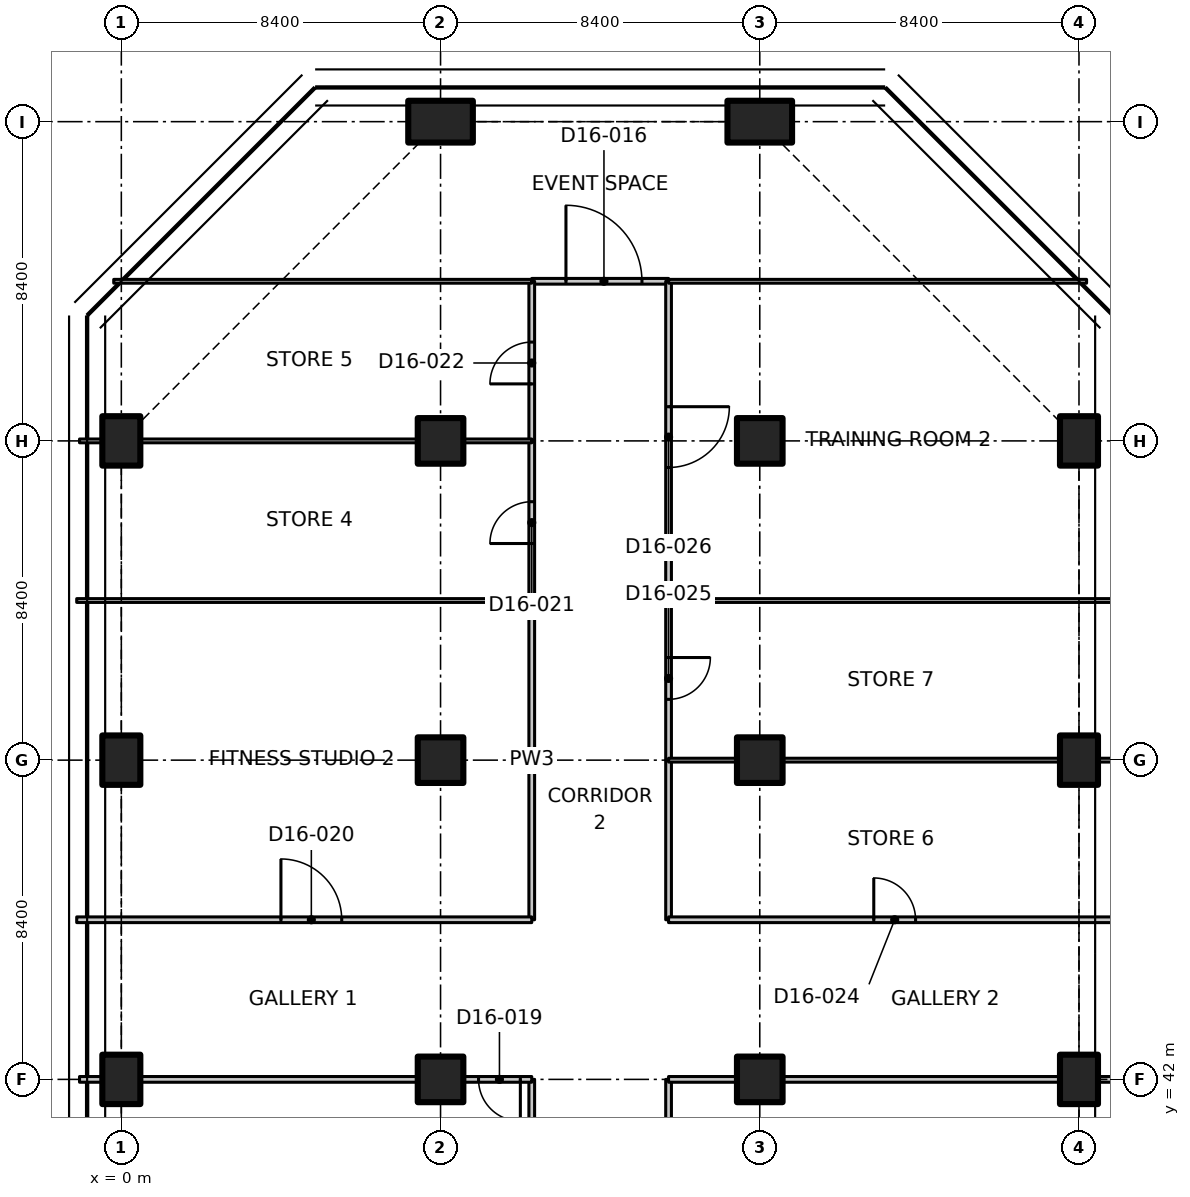
"""IFC4 building model, lengths in metres.
Left out: names, types, materials, properties, quantities, classifications, styles, units other than length and angle.
Written with IfcOpenShell. Run it as: python <this file> out.ifc"""

import sys

from ifc_helpers import new_model, si_unit, direction, frame, frame_2d, origin, origin_2d, place, context, subcontext, project, spatial, polyline, rectangle, outline, extrude, element, fill, save


model = new_model("IFC4")
c1 = context("Model", 3, precision=1e-05, world=origin(), true_north=direction((0.0, 1.0)))
c2 = subcontext(c1, "Body", "Model", "MODEL_VIEW")
j1 = project(units=[si_unit("LENGTHUNIT", "METRE"), si_unit("PLANEANGLEUNIT", "RADIAN")], contexts=[c1])
p1 = place(None, origin())
s1 = spatial("IfcSite", under=j1, at=p1, CompositionType="ELEMENT")
p2 = place(p1, origin())
s2 = spatial("IfcBuilding", under=s1, at=p2, CompositionType="ELEMENT")
p3 = place(p2, frame((0.0, 0.0, 124.1)))
s3 = spatial("IfcBuildingStorey", under=s2, at=p3, CompositionType="ELEMENT", Elevation=124.1)
for number, where, z_axis, x_axis in (
    (1, (0.0, 42.0, 0.0), (0.0, 0.0, 1.0), (1.0, 0.0, 0.0)),
    (2, (0.0, 50.4, 0.0), (0.0, 0.0, 1.0), (1.0, 0.0, 0.0)),
    (3, (0.0, 58.8, 0.0), (0.0, 0.0, 1.0), (1.0, 0.0, 0.0)),
):
    element("IfcColumn", number, at=place(p3, frame(where, z_axis=z_axis, x_axis=x_axis)), inside=s3, PredefinedType="COLUMN", context=c2, shape_type="SweptSolid", body=[
        extrude(rectangle(XDim=1.0, YDim=1.3, at=origin_2d()), origin(), (0.0, 0.0, 1.0), 3.35),
    ])
for number, where, z_axis, x_axis in (
    (4, (8.4, 42.0, 0.0), (0.0, 0.0, 1.0), (1.0, 0.0, 0.0)),
    (5, (8.4, 50.4, 0.0), (0.0, 0.0, 1.0), (1.0, 0.0, 0.0)),
    (6, (8.4, 58.8, 0.0), (0.0, 0.0, 1.0), (1.0, 0.0, 0.0)),
):
    element("IfcColumn", number, at=place(p3, frame(where, z_axis=z_axis, x_axis=x_axis)), inside=s3, PredefinedType="COLUMN", context=c2, shape_type="SweptSolid", body=[
        extrude(rectangle(XDim=1.2, YDim=1.2, at=origin_2d()), origin(), (0.0, 0.0, 1.0), 3.35),
    ])
p4 = place(p3, frame((8.4, 67.2, 0.0), z_axis=(0.0, 0.0, 1.0), x_axis=(0.0, 1.0, 0.0)))
e7 = element("IfcColumn", 7, at=p4, inside=s3, PredefinedType="COLUMN", context=c2, shape_type="SweptSolid", body=[
    extrude(rectangle(XDim=1.1, YDim=1.7, at=origin_2d()), origin(), (0.0, 0.0, 1.0), 3.35),
])
for number, where, z_axis, x_axis in (
    (8, (16.8, 42.0, 0.0), (0.0, 0.0, 1.0), (1.0, 0.0, 0.0)),
    (9, (16.8, 50.4, 0.0), (0.0, 0.0, 1.0), (1.0, 0.0, 0.0)),
    (10, (16.8, 58.8, 0.0), (0.0, 0.0, 1.0), (1.0, 0.0, 0.0)),
):
    element("IfcColumn", number, at=place(p3, frame(where, z_axis=z_axis, x_axis=x_axis)), inside=s3, PredefinedType="COLUMN", context=c2, shape_type="SweptSolid", body=[
        extrude(rectangle(XDim=1.2, YDim=1.2, at=origin_2d()), origin(), (0.0, 0.0, 1.0), 3.35),
    ])
p5 = place(p3, frame((16.8, 67.2, 0.0), z_axis=(0.0, 0.0, 1.0), x_axis=(0.0, 1.0, 0.0)))
e11 = element("IfcColumn", 11, at=p5, inside=s3, PredefinedType="COLUMN", context=c2, shape_type="SweptSolid", body=[
    extrude(rectangle(XDim=1.1, YDim=1.7, at=origin_2d()), origin(), (0.0, 0.0, 1.0), 3.35),
])
for number, where, z_axis, x_axis in (
    (12, (25.2, 42.0, 0.0), (0.0, 0.0, 1.0), (1.0, 0.0, 0.0)),
    (13, (25.2, 50.4, 0.0), (0.0, 0.0, 1.0), (1.0, 0.0, 0.0)),
    (14, (25.2, 58.8, 0.0), (0.0, 0.0, 1.0), (1.0, 0.0, 0.0)),
):
    element("IfcColumn", number, at=place(p3, frame(where, z_axis=z_axis, x_axis=x_axis)), inside=s3, PredefinedType="COLUMN", context=c2, shape_type="SweptSolid", body=[
        extrude(rectangle(XDim=1.0, YDim=1.3, at=origin_2d()), origin(), (0.0, 0.0, 1.0), 3.35),
    ])
p6 = place(p3, frame((10.8, 63.0, 0.0), z_axis=(0.0, 0.0, 1.0), x_axis=(1.0, 0.0, 0.0)))
e15 = element("IfcWall", 15, at=p6, inside=s3, PredefinedType="PARTITIONING", context=c2, shape_type="SweptSolid", body=[
    extrude(rectangle(XDim=3.6, YDim=0.15, at=frame_2d((1.8, 0.0))), origin(), (0.0, 0.0, 1.0), 3.33),
])
p7 = place(p6, frame((0.9, 0.0, 0.0)))
e16 = element("IfcOpeningElement", 16, at=p7, cuts=e15, PredefinedType="OPENING", context=c2, shape_type="SweptSolid", body=[
    extrude(rectangle(XDim=2.0, YDim=2.4, at=frame_2d((1.0, 1.2))), frame((0.0, 0.085, 0.0), z_axis=(0.0, -1.0, 0.0), x_axis=(1.0, 0.0, 0.0)), (0.0, 0.0, 1.0), 0.17),
])
p8 = place(p3, frame((10.8, 37.8, 0.0), z_axis=(0.0, 0.0, 1.0), x_axis=(0.0, 1.0, 0.0)))
e17 = element("IfcWall", 17, at=p8, inside=s3, PredefinedType="PARTITIONING", context=c2, shape_type="SweptSolid", body=[
    extrude(rectangle(XDim=4.2, YDim=0.15, at=frame_2d((2.1, 0.0))), origin(), (0.0, 0.0, 1.0), 3.33),
])
p9 = place(p3, frame((10.8, 46.2, 0.0), z_axis=(0.0, 0.0, 1.0), x_axis=(0.0, 1.0, 0.0)))
e18 = element("IfcWall", 18, at=p9, inside=s3, PredefinedType="PARTITIONING", context=c2, shape_type="SweptSolid", body=[
    extrude(rectangle(XDim=8.4, YDim=0.15, at=frame_2d((4.2, 0.0))), origin(), (0.0, 0.0, 1.0), 3.33),
])
p10 = place(p3, frame((10.8, 54.6, 0.0), z_axis=(0.0, 0.0, 1.0), x_axis=(0.0, 1.0, 0.0)))
e19 = element("IfcWall", 19, at=p10, inside=s3, PredefinedType="PARTITIONING", context=c2, shape_type="SweptSolid", body=[
    extrude(rectangle(XDim=4.2, YDim=0.15, at=frame_2d((2.1, 0.0))), origin(), (0.0, 0.0, 1.0), 3.33),
])
p11 = place(p10, frame((1.5, 0.0, 0.0)))
e20 = element("IfcOpeningElement", 20, at=p11, cuts=e19, PredefinedType="OPENING", context=c2, shape_type="SweptSolid", body=[
    extrude(rectangle(XDim=1.1, YDim=2.1, at=frame_2d((0.55, 1.05))), frame((0.0, 0.085, 0.0), z_axis=(0.0, -1.0, 0.0), x_axis=(1.0, 0.0, 0.0)), (0.0, 0.0, 1.0), 0.17),
])
p12 = place(p3, frame((10.8, 58.8, 0.0), z_axis=(0.0, 0.0, 1.0), x_axis=(0.0, 1.0, 0.0)))
e21 = element("IfcWall", 21, at=p12, inside=s3, PredefinedType="PARTITIONING", context=c2, shape_type="SweptSolid", body=[
    extrude(rectangle(XDim=4.2, YDim=0.15, at=frame_2d((2.1, 0.0))), origin(), (0.0, 0.0, 1.0), 3.33),
])
p13 = place(p12, frame((1.5, 0.0, 0.0)))
e22 = element("IfcOpeningElement", 22, at=p13, cuts=e21, PredefinedType="OPENING", context=c2, shape_type="SweptSolid", body=[
    extrude(rectangle(XDim=1.1, YDim=2.1, at=frame_2d((0.55, 1.05))), frame((0.0, 0.085, 0.0), z_axis=(0.0, -1.0, 0.0), x_axis=(1.0, 0.0, 0.0)), (0.0, 0.0, 1.0), 0.17),
])
p14 = place(p3, frame((14.4, 42.0, 0.0), z_axis=(0.0, 0.0, 1.0), x_axis=(0.0, -1.0, 0.0)))
e23 = element("IfcWall", 23, at=p14, inside=s3, PredefinedType="PARTITIONING", context=c2, shape_type="SweptSolid", body=[
    extrude(rectangle(XDim=8.4, YDim=0.15, at=frame_2d((4.2, 0.0))), origin(), (0.0, 0.0, 1.0), 3.33),
])
p15 = place(p3, frame((14.4, 50.4, 0.0), z_axis=(0.0, 0.0, 1.0), x_axis=(0.0, -1.0, 0.0)))
e24 = element("IfcWall", 24, at=p15, inside=s3, PredefinedType="PARTITIONING", context=c2, shape_type="SweptSolid", body=[
    extrude(rectangle(XDim=4.2, YDim=0.15, at=frame_2d((2.1, 0.0))), origin(), (0.0, 0.0, 1.0), 3.33),
])
p16 = place(p3, frame((14.4, 54.6, 0.0), z_axis=(0.0, 0.0, 1.0), x_axis=(0.0, -1.0, 0.0)))
e25 = element("IfcWall", 25, at=p16, inside=s3, PredefinedType="PARTITIONING", context=c2, shape_type="SweptSolid", body=[
    extrude(rectangle(XDim=4.2, YDim=0.15, at=frame_2d((2.1, 0.0))), origin(), (0.0, 0.0, 1.0), 3.33),
])
p17 = place(p16, frame((1.5, 0.0, 0.0)))
e26 = element("IfcOpeningElement", 26, at=p17, cuts=e25, PredefinedType="OPENING", context=c2, shape_type="SweptSolid", body=[
    extrude(rectangle(XDim=1.1, YDim=2.1, at=frame_2d((0.55, 1.05))), frame((0.0, 0.085, 0.0), z_axis=(0.0, -1.0, 0.0), x_axis=(1.0, 0.0, 0.0)), (0.0, 0.0, 1.0), 0.17),
])
p18 = place(p3, frame((14.4, 63.0, 0.0), z_axis=(0.0, 0.0, 1.0), x_axis=(0.0, -1.0, 0.0)))
e27 = element("IfcWall", 27, at=p18, inside=s3, PredefinedType="PARTITIONING", context=c2, shape_type="SweptSolid", body=[
    extrude(rectangle(XDim=8.4, YDim=0.15, at=frame_2d((4.2, 0.0))), origin(), (0.0, 0.0, 1.0), 3.33),
])
p19 = place(p18, frame((3.3, 0.0, 0.0)))
e28 = element("IfcOpeningElement", 28, at=p19, cuts=e27, PredefinedType="OPENING", context=c2, shape_type="SweptSolid", body=[
    extrude(rectangle(XDim=1.6, YDim=2.1, at=frame_2d((0.8, 1.05))), frame((0.0, 0.085, 0.0), z_axis=(0.0, -1.0, 0.0), x_axis=(1.0, 0.0, 0.0)), (0.0, 0.0, 1.0), 0.17),
])
p20 = place(p3, frame((10.8, 63.0, 0.0), z_axis=(0.0, 0.0, 1.0), x_axis=(-1.0, 0.0, 0.0)))
e29 = element("IfcWall", 29, at=p20, inside=s3, PredefinedType="PARTITIONING", context=c2, shape_type="SweptSolid", body=[
    extrude(outline(polyline([(0.0, 0.0), (11.0, 0.0), (11.0, 3.33), (7.266, 3.33), (7.264, 2.98), (5.936, 2.98), (5.934, 3.33), (0.0, 3.33), (0.0, 0.0)])), frame((0.0, 0.05, 0.0), z_axis=(0.0, -1.0, 0.0), x_axis=(1.0, 0.0, 0.0)), (0.0, 0.0, 1.0), 0.1),
])
p21 = place(p3, frame((25.4, 63.0, 0.0), z_axis=(0.0, 0.0, 1.0), x_axis=(-1.0, 0.0, 0.0)))
e30 = element("IfcWall", 30, at=p21, inside=s3, PredefinedType="PARTITIONING", context=c2, shape_type="SweptSolid", body=[
    extrude(outline(polyline([(0.0, 0.0), (11.0, 0.0), (11.0, 3.33), (5.066, 3.33), (5.064, 2.98), (3.736, 2.98), (3.734, 3.33), (0.0, 3.33), (0.0, 0.0)])), frame((0.0, 0.05, 0.0), z_axis=(0.0, -1.0, 0.0), x_axis=(1.0, 0.0, 0.0)), (0.0, 0.0, 1.0), 0.1),
])
p22 = place(p3, frame((10.8, 42.0, 0.0), z_axis=(0.0, 0.0, 1.0), x_axis=(-1.0, 0.0, 0.0)))
e31 = element("IfcWall", 31, at=p22, inside=s3, PredefinedType="PARTITIONING", context=c2, shape_type="SweptSolid", body=[
    extrude(rectangle(XDim=1.78, YDim=0.15, at=frame_2d((0.89, 0.0))), origin(), (0.0, 0.0, 1.0), 3.33),
])
p23 = place(p22, frame((0.3, 0.0, 0.0)))
e32 = element("IfcOpeningElement", 32, at=p23, cuts=e31, PredefinedType="OPENING", context=c2, shape_type="SweptSolid", body=[
    extrude(rectangle(XDim=1.1, YDim=2.1, at=frame_2d((0.55, 1.05))), frame((0.0, 0.085, 0.0), z_axis=(0.0, -1.0, 0.0), x_axis=(1.0, 0.0, 0.0)), (0.0, 0.0, 1.0), 0.17),
])
p24 = place(p3, frame((7.78, 42.0, 0.0), z_axis=(0.0, 0.0, 1.0), x_axis=(-1.0, 0.0, 0.0)))
e33 = element("IfcWall", 33, at=p24, inside=s3, PredefinedType="PARTITIONING", context=c2, shape_type="SweptSolid", body=[
    extrude(rectangle(XDim=7.26, YDim=0.15, at=frame_2d((3.63, 0.0))), origin(), (0.0, 0.0, 1.0), 3.33),
])
p25 = place(p3, frame((-0.52, 42.0, 0.0), z_axis=(0.0, 0.0, 1.0), x_axis=(-1.0, 0.0, 0.0)))
e34 = element("IfcWall", 34, at=p25, inside=s3, PredefinedType="PARTITIONING", context=c2, shape_type="SweptSolid", body=[
    extrude(rectangle(XDim=0.58, YDim=0.15, at=frame_2d((0.29, 0.0))), origin(), (0.0, 0.0, 1.0), 3.33),
])
p26 = place(p3, frame((-1.174, 46.2, 0.0), z_axis=(0.0, 0.0, 1.0), x_axis=(1.0, 0.0, 0.0)))
e35 = element("IfcWall", 35, at=p26, inside=s3, PredefinedType="PARTITIONING", context=c2, shape_type="SweptSolid", body=[
    extrude(outline(polyline([(0.0, 0.0), (11.974, 0.0), (11.974, 3.33), (1.624, 3.33), (1.622, 2.98), (0.726, 2.98), (0.724, 3.33), (0.074, 3.33), (0.0, 3.33), (0.0, 0.0)])), frame((0.0, 0.075, 0.0), z_axis=(0.0, -1.0, 0.0), x_axis=(1.0, 0.0, 0.0)), (0.0, 0.0, 1.0), 0.15),
])
p27 = place(p26, frame((5.374, 0.0, 0.0)))
e36 = element("IfcOpeningElement", 36, at=p27, cuts=e35, PredefinedType="OPENING", context=c2, shape_type="SweptSolid", body=[
    extrude(rectangle(XDim=1.6, YDim=2.1, at=frame_2d((0.8, 1.05))), frame((0.0, 0.085, 0.0), z_axis=(0.0, -1.0, 0.0), x_axis=(1.0, 0.0, 0.0)), (0.0, 0.0, 1.0), 0.17),
])
p28 = place(p3, frame((-1.174, 54.6, 0.0), z_axis=(0.0, 0.0, 1.0), x_axis=(1.0, 0.0, 0.0)))
e37 = element("IfcWall", 37, at=p28, inside=s3, PredefinedType="PARTITIONING", context=c2, shape_type="SweptSolid", body=[
    extrude(outline(polyline([(0.0, 0.0), (11.974, 0.0), (11.974, 3.33), (1.624, 3.33), (1.622, 2.98), (0.726, 2.98), (0.724, 3.33), (0.074, 3.33), (0.0, 3.33), (0.0, 0.0)])), frame((0.0, 0.05, 0.0), z_axis=(0.0, -1.0, 0.0), x_axis=(1.0, 0.0, 0.0)), (0.0, 0.0, 1.0), 0.1),
])
p29 = place(p3, frame((-1.1, 58.8, 0.0), z_axis=(0.0, 0.0, 1.0), x_axis=(1.0, 0.0, 0.0)))
e38 = element("IfcWall", 38, at=p29, inside=s3, PredefinedType="PARTITIONING", context=c2, shape_type="SweptSolid", body=[
    extrude(rectangle(XDim=0.58, YDim=0.1, at=frame_2d((0.29, 0.0))), origin(), (0.0, 0.0, 1.0), 3.33),
])
p30 = place(p3, frame((0.52, 58.8, 0.0), z_axis=(0.0, 0.0, 1.0), x_axis=(1.0, 0.0, 0.0)))
e39 = element("IfcWall", 39, at=p30, inside=s3, PredefinedType="PARTITIONING", context=c2, shape_type="SweptSolid", body=[
    extrude(outline(polyline([(0.0, 0.0), (7.26, 0.0), (7.26, 3.33), (0.146, 3.33), (0.144, 2.98), (0.0, 2.98), (0.0, 0.0)])), frame((0.0, 0.05, 0.0), z_axis=(0.0, -1.0, 0.0), x_axis=(1.0, 0.0, 0.0)), (0.0, 0.0, 1.0), 0.1),
])
p31 = place(p3, frame((9.02, 58.8, 0.0), z_axis=(0.0, 0.0, 1.0), x_axis=(1.0, 0.0, 0.0)))
e40 = element("IfcWall", 40, at=p31, inside=s3, PredefinedType="PARTITIONING", context=c2, shape_type="SweptSolid", body=[
    extrude(rectangle(XDim=1.78, YDim=0.1, at=frame_2d((0.89, 0.0))), origin(), (0.0, 0.0, 1.0), 3.33),
])
p32 = place(p3, frame((29.011, 42.0, 0.0), z_axis=(0.0, 0.0, 1.0), x_axis=(-1.0, 0.0, 0.0)))
e41 = element("IfcWall", 41, at=p32, inside=s3, PredefinedType="PARTITIONING", context=c2, shape_type="SweptSolid", body=[
    extrude(rectangle(XDim=3.292, YDim=0.15, at=frame_2d((1.646, 0.0))), origin(), (0.0, 0.0, 1.0), 2.98),
])
p33 = place(p32, frame((0.8, 0.0, 0.0)))
e42 = element("IfcOpeningElement", 42, at=p33, cuts=e41, PredefinedType="OPENING", context=c2, shape_type="SweptSolid", body=[
    extrude(rectangle(XDim=1.8, YDim=2.1, at=frame_2d((0.9, 1.05))), frame((0.0, 0.085, 0.0), z_axis=(0.0, -1.0, 0.0), x_axis=(1.0, 0.0, 0.0)), (0.0, 0.0, 1.0), 0.17),
])
p34 = place(p3, frame((24.68, 42.0, 0.0), z_axis=(0.0, 0.0, 1.0), x_axis=(-1.0, 0.0, 0.0)))
e43 = element("IfcWall", 43, at=p34, inside=s3, PredefinedType="PARTITIONING", context=c2, shape_type="SweptSolid", body=[
    extrude(rectangle(XDim=7.26, YDim=0.15, at=frame_2d((3.63, 0.0))), origin(), (0.0, 0.0, 1.0), 3.33),
])
p35 = place(p3, frame((16.18, 42.0, 0.0), z_axis=(0.0, 0.0, 1.0), x_axis=(-1.0, 0.0, 0.0)))
e44 = element("IfcWall", 44, at=p35, inside=s3, PredefinedType="PARTITIONING", context=c2, shape_type="SweptSolid", body=[
    extrude(rectangle(XDim=1.78, YDim=0.15, at=frame_2d((0.89, 0.0))), origin(), (0.0, 0.0, 1.0), 3.33),
])
p36 = place(p3, frame((14.4, 46.2, 0.0), z_axis=(0.0, 0.0, 1.0), x_axis=(1.0, 0.0, 0.0)))
e45 = element("IfcWall", 45, at=p36, inside=s3, PredefinedType="PARTITIONING", context=c2, shape_type="SweptSolid", body=[
    extrude(outline(polyline([(0.0, 0.0), (11.974, 0.0), (11.974, 3.33), (11.9, 3.33), (11.25, 3.33), (11.248, 2.98), (10.352, 2.98), (10.35, 3.33), (0.0, 3.33), (0.0, 0.0)])), frame((0.0, 0.075, 0.0), z_axis=(0.0, -1.0, 0.0), x_axis=(1.0, 0.0, 0.0)), (0.0, 0.0, 1.0), 0.15),
])
p37 = place(p36, frame((5.4, 0.0, 0.0)))
e46 = element("IfcOpeningElement", 46, at=p37, cuts=e45, PredefinedType="OPENING", context=c2, shape_type="SweptSolid", body=[
    extrude(rectangle(XDim=1.1, YDim=2.1, at=frame_2d((0.55, 1.05))), frame((0.0, 0.085, 0.0), z_axis=(0.0, -1.0, 0.0), x_axis=(1.0, 0.0, 0.0)), (0.0, 0.0, 1.0), 0.17),
])
p38 = place(p3, frame((14.4, 50.4, 0.0), z_axis=(0.0, 0.0, 1.0), x_axis=(1.0, 0.0, 0.0)))
e47 = element("IfcWall", 47, at=p38, inside=s3, PredefinedType="PARTITIONING", context=c2, shape_type="SweptSolid", body=[
    extrude(rectangle(XDim=1.78, YDim=0.1, at=frame_2d((0.89, 0.0))), origin(), (0.0, 0.0, 1.0), 3.33),
])
p39 = place(p3, frame((17.42, 50.4, 0.0), z_axis=(0.0, 0.0, 1.0), x_axis=(1.0, 0.0, 0.0)))
e48 = element("IfcWall", 48, at=p39, inside=s3, PredefinedType="PARTITIONING", context=c2, shape_type="SweptSolid", body=[
    extrude(rectangle(XDim=7.26, YDim=0.1, at=frame_2d((3.63, 0.0))), origin(), (0.0, 0.0, 1.0), 3.33),
])
p40 = place(p3, frame((25.72, 50.4, 0.0), z_axis=(0.0, 0.0, 1.0), x_axis=(1.0, 0.0, 0.0)))
e49 = element("IfcWall", 49, at=p40, inside=s3, PredefinedType="PARTITIONING", context=c2, shape_type="SweptSolid", body=[
    extrude(rectangle(XDim=0.58, YDim=0.1, at=frame_2d((0.29, 0.0))), origin(), (0.0, 0.0, 1.0), 3.33),
])
p41 = place(p3, frame((14.4, 54.6, 0.0), z_axis=(0.0, 0.0, 1.0), x_axis=(1.0, 0.0, 0.0)))
e50 = element("IfcWall", 50, at=p41, inside=s3, PredefinedType="PARTITIONING", context=c2, shape_type="SweptSolid", body=[
    extrude(outline(polyline([(0.0, 0.0), (11.974, 0.0), (11.974, 3.33), (11.9, 3.33), (11.25, 3.33), (11.248, 2.98), (10.352, 2.98), (10.35, 3.33), (0.0, 3.33), (0.0, 0.0)])), frame((0.0, 0.05, 0.0), z_axis=(0.0, -1.0, 0.0), x_axis=(1.0, 0.0, 0.0)), (0.0, 0.0, 1.0), 0.1),
])
p42 = place(p7, origin())
e51 = element("IfcDoor", 51, at=p42, inside=s3, OperationType="DOUBLE_DOOR_SINGLE_SWING", PredefinedType="DOOR", context=c2, shape_type="SweptSolid", body=[
    extrude(rectangle(XDim=2.0, YDim=2.4, at=frame_2d((1.0, 1.2))), frame((0.0, 0.025, 0.0), z_axis=(0.0, -1.0, 0.0), x_axis=(1.0, 0.0, 0.0)), (0.0, 0.0, 1.0), 0.05),
])
fill(e16, e51)
p43 = place(p23, origin())
e52 = element("IfcDoor", 52, at=p43, inside=s3, OperationType="SINGLE_SWING_LEFT", PredefinedType="DOOR", context=c2, shape_type="SweptSolid", body=[
    extrude(rectangle(XDim=1.1, YDim=2.1, at=frame_2d((0.55, 1.05))), frame((0.0, 0.025, 0.0), z_axis=(0.0, -1.0, 0.0), x_axis=(1.0, 0.0, 0.0)), (0.0, 0.0, 1.0), 0.05),
])
fill(e32, e52)
p44 = place(p27, origin())
e53 = element("IfcDoor", 53, at=p44, inside=s3, OperationType="DOUBLE_DOOR_SINGLE_SWING", PredefinedType="DOOR", context=c2, shape_type="SweptSolid", body=[
    extrude(rectangle(XDim=1.6, YDim=2.1, at=frame_2d((0.8, 1.05))), frame((0.0, 0.025, 0.0), z_axis=(0.0, -1.0, 0.0), x_axis=(1.0, 0.0, 0.0)), (0.0, 0.0, 1.0), 0.05),
])
fill(e36, e53)
p45 = place(p11, origin())
e54 = element("IfcDoor", 54, at=p45, inside=s3, OperationType="SINGLE_SWING_LEFT", PredefinedType="DOOR", context=c2, shape_type="SweptSolid", body=[
    extrude(rectangle(XDim=1.1, YDim=2.1, at=frame_2d((0.55, 1.05))), frame((0.0, 0.025, 0.0), z_axis=(0.0, -1.0, 0.0), x_axis=(1.0, 0.0, 0.0)), (0.0, 0.0, 1.0), 0.05),
])
fill(e20, e54)
p46 = place(p13, origin())
e55 = element("IfcDoor", 55, at=p46, inside=s3, OperationType="SINGLE_SWING_LEFT", PredefinedType="DOOR", context=c2, shape_type="SweptSolid", body=[
    extrude(rectangle(XDim=1.1, YDim=2.1, at=frame_2d((0.55, 1.05))), frame((0.0, 0.025, 0.0), z_axis=(0.0, -1.0, 0.0), x_axis=(1.0, 0.0, 0.0)), (0.0, 0.0, 1.0), 0.05),
])
fill(e22, e55)
p47 = place(p37, origin())
e56 = element("IfcDoor", 56, at=p47, inside=s3, OperationType="SINGLE_SWING_LEFT", PredefinedType="DOOR", context=c2, shape_type="SweptSolid", body=[
    extrude(rectangle(XDim=1.1, YDim=2.1, at=frame_2d((0.55, 1.05))), frame((0.0, 0.025, 0.0), z_axis=(0.0, -1.0, 0.0), x_axis=(1.0, 0.0, 0.0)), (0.0, 0.0, 1.0), 0.05),
])
fill(e46, e56)
p48 = place(p17, origin())
e57 = element("IfcDoor", 57, at=p48, inside=s3, OperationType="SINGLE_SWING_LEFT", PredefinedType="DOOR", context=c2, shape_type="SweptSolid", body=[
    extrude(rectangle(XDim=1.1, YDim=2.1, at=frame_2d((0.55, 1.05))), frame((0.0, 0.025, 0.0), z_axis=(0.0, -1.0, 0.0), x_axis=(1.0, 0.0, 0.0)), (0.0, 0.0, 1.0), 0.05),
])
fill(e26, e57)
p49 = place(p19, origin())
e58 = element("IfcDoor", 58, at=p49, inside=s3, OperationType="DOUBLE_DOOR_SINGLE_SWING", PredefinedType="DOOR", context=c2, shape_type="SweptSolid", body=[
    extrude(rectangle(XDim=1.6, YDim=2.1, at=frame_2d((0.8, 1.05))), frame((0.0, 0.025, 0.0), z_axis=(0.0, -1.0, 0.0), x_axis=(1.0, 0.0, 0.0)), (0.0, 0.0, 1.0), 0.05),
])
fill(e28, e58)
save(model, sys.argv[1])
